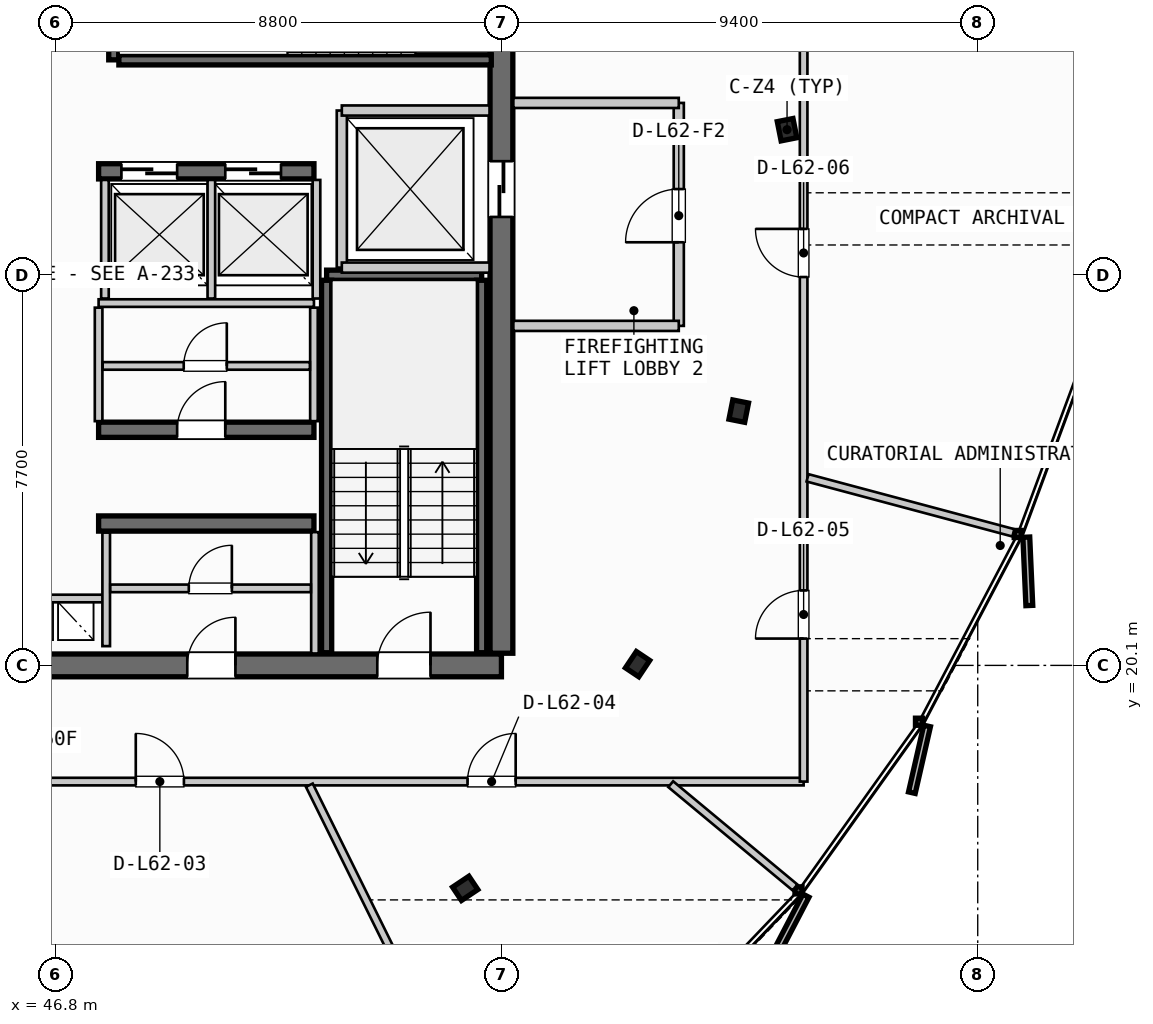
"""IFC4 building model, lengths in metres.
Left out: names, types, materials, properties, quantities, classifications, styles, units other than length and angle.
Written with IfcOpenShell. Run it as: python <this file> out.ifc"""

import sys

from ifc_helpers import new_model, si_unit, direction, frame, frame_2d, origin, origin_2d, place, context, subcontext, project, spatial, rectangle, i_section, extrude, source, transform, mapped, element, fill, save


model = new_model("IFC4")
c1 = context("Model", 3, precision=1e-05, world=origin(), true_north=direction((0.0, 1.0)))
c2 = subcontext(c1, "Body", "Model", "MODEL_VIEW")
j1 = project(units=[si_unit("LENGTHUNIT", "METRE"), si_unit("PLANEANGLEUNIT", "RADIAN")], contexts=[c1])
p1 = place(None, origin())
s1 = spatial("IfcSite", under=j1, at=p1, CompositionType="ELEMENT")
p2 = place(p1, origin())
s2 = spatial("IfcBuilding", under=s1, at=p2, CompositionType="ELEMENT")
p3 = place(p2, frame((0.0, 0.0, 238.75)))
s3 = spatial("IfcBuildingStorey", under=s2, at=p3, CompositionType="ELEMENT", Elevation=238.75)
p4 = place(p3, frame((38.0, 20.1, 0.0), z_axis=(0.0, 0.0, 1.0), x_axis=(1.0, 0.0, 0.0)))
e1 = element("IfcWall", 1, at=p4, inside=s3, PredefinedType="SHEAR", context=c2, shape_type="SweptSolid", body=[
    extrude(rectangle(XDim=17.6, YDim=0.45, at=frame_2d((8.8, 0.0))), origin(), (0.0, 0.0, 1.0), 3.21),
])
p5 = place(p4, frame((1.4, 0.0, 0.0)))
e2 = element("IfcOpeningElement", 2, at=p5, cuts=e1, PredefinedType="OPENING", context=c2, shape_type="SweptSolid", body=[
    extrude(rectangle(XDim=1.05, YDim=2.15, at=frame_2d((0.525, 1.075))), frame((0.0, 0.235, 0.0), z_axis=(0.0, -1.0, 0.0), x_axis=(1.0, 0.0, 0.0)), (0.0, 0.0, 1.0), 0.47),
])
p6 = place(p4, frame((15.15, 0.0, 0.0)))
e3 = element("IfcOpeningElement", 3, at=p6, cuts=e1, PredefinedType="OPENING", context=c2, shape_type="SweptSolid", body=[
    extrude(rectangle(XDim=1.05, YDim=2.15, at=frame_2d((0.525, 1.075))), frame((0.0, 0.235, 0.0), z_axis=(0.0, -1.0, 0.0), x_axis=(1.0, 0.0, 0.0)), (0.0, 0.0, 1.0), 0.47),
])
p7 = place(p4, frame((5.25, 0.0, 0.0)))
e4 = element("IfcOpeningElement", 4, at=p7, cuts=e1, PredefinedType="OPENING", context=c2, shape_type="SweptSolid", body=[
    extrude(rectangle(XDim=0.9, YDim=2.15, at=frame_2d((0.45, 1.075))), frame((0.0, 0.235, 0.0), z_axis=(0.0, -1.0, 0.0), x_axis=(1.0, 0.0, 0.0)), (0.0, 0.0, 1.0), 0.47),
])
p8 = place(p4, frame((11.4, 0.0, 0.0)))
e5 = element("IfcOpeningElement", 5, at=p8, cuts=e1, PredefinedType="OPENING", context=c2, shape_type="SweptSolid", body=[
    extrude(rectangle(XDim=0.95, YDim=2.15, at=frame_2d((0.475, 1.075))), frame((0.0, 0.235, 0.0), z_axis=(0.0, -1.0, 0.0), x_axis=(1.0, 0.0, 0.0)), (0.0, 0.0, 1.0), 0.47),
])
p9 = place(p3, frame((55.6, 20.34, 0.0), z_axis=(0.0, 0.0, 1.0), x_axis=(0.0, 1.0, 0.0)))
e6 = element("IfcWall", 6, at=p9, inside=s3, PredefinedType="SHEAR", context=c2, shape_type="SweptSolid", body=[
    extrude(rectangle(XDim=14.92, YDim=0.45, at=frame_2d((7.46, 0.0))), origin(), (0.0, 0.0, 1.0), 3.21),
])
p10 = place(p9, frame((12.71, 0.0, 0.0)))
e7 = element("IfcOpeningElement", 7, at=p10, cuts=e6, PredefinedType="OPENING", context=c2, shape_type="SweptSolid", body=[
    extrude(rectangle(XDim=1.05, YDim=2.15, at=frame_2d((0.525, 1.075))), frame((0.0, 0.235, 0.0), z_axis=(0.0, -1.0, 0.0), x_axis=(1.0, 0.0, 0.0)), (0.0, 0.0, 1.0), 0.47),
])
p11 = place(p9, frame((8.61, 0.0, 0.0)))
e8 = element("IfcOpeningElement", 8, at=p11, cuts=e6, PredefinedType="OPENING", context=c2, shape_type="SweptSolid", body=[
    extrude(rectangle(XDim=1.1, YDim=2.2, at=frame_2d((0.55, 1.1))), frame((0.0, 0.235, 0.0), z_axis=(0.0, -1.0, 0.0), x_axis=(1.0, 0.0, 0.0)), (0.0, 0.0, 1.0), 0.47),
])
p12 = place(p3, frame((47.65, 22.9, 0.0), z_axis=(0.0, 0.0, 1.0), x_axis=(1.0, 0.0, 0.0)))
e9 = element("IfcWall", 9, at=p12, inside=s3, PredefinedType="SHEAR", context=c2, shape_type="SweptSolid", body=[
    extrude(rectangle(XDim=4.25, YDim=0.3, at=frame_2d((2.125, 0.0))), origin(), (0.0, 0.0, 1.0), 3.21),
])
p13 = place(p3, frame((47.65, 24.75, 0.0), z_axis=(0.0, 0.0, 1.0), x_axis=(1.0, 0.0, 0.0)))
e10 = element("IfcWall", 10, at=p13, inside=s3, PredefinedType="SHEAR", context=c2, shape_type="SweptSolid", body=[
    extrude(rectangle(XDim=4.25, YDim=0.3, at=frame_2d((2.125, 0.0))), origin(), (0.0, 0.0, 1.0), 3.21),
])
p14 = place(p13, frame((1.55, 0.0, 0.0)))
e11 = element("IfcOpeningElement", 11, at=p14, cuts=e10, PredefinedType="OPENING", context=c2, shape_type="SweptSolid", body=[
    extrude(rectangle(XDim=0.95, YDim=2.15, at=frame_2d((0.475, 1.075))), frame((0.0, 0.16, 0.0), z_axis=(0.0, -1.0, 0.0), x_axis=(1.0, 0.0, 0.0)), (0.0, 0.0, 1.0), 0.32),
])
p15 = place(p3, frame((47.65, 29.85, 0.0), z_axis=(0.0, 0.0, 1.0), x_axis=(1.0, 0.0, 0.0)))
e12 = element("IfcWall", 12, at=p15, inside=s3, PredefinedType="SHEAR", context=c2, shape_type="SweptSolid", body=[
    extrude(rectangle(XDim=4.25, YDim=0.3, at=frame_2d((2.125, 0.0))), origin(), (0.0, 0.0, 1.0), 3.21),
])
p16 = place(p15, frame((0.45, 0.0, 0.0)))
e13 = element("IfcOpeningElement", 13, at=p16, cuts=e12, PredefinedType="OPENING", context=c2, shape_type="SweptSolid", body=[
    extrude(rectangle(XDim=1.1, YDim=2.2, at=frame_2d((0.55, 1.1))), frame((0.0, 0.16, 0.0), z_axis=(0.0, -1.0, 0.0), x_axis=(1.0, 0.0, 0.0)), (0.0, 0.0, 1.0), 0.32),
])
p17 = place(p15, frame((2.5, 0.0, 0.0)))
e14 = element("IfcOpeningElement", 14, at=p17, cuts=e12, PredefinedType="OPENING", context=c2, shape_type="SweptSolid", body=[
    extrude(rectangle(XDim=1.1, YDim=2.2, at=frame_2d((0.55, 1.1))), frame((0.0, 0.16, 0.0), z_axis=(0.0, -1.0, 0.0), x_axis=(1.0, 0.0, 0.0)), (0.0, 0.0, 1.0), 0.32),
])
m1 = source(origin(), c2, "Body", "SweptSolid", [
    extrude(i_section(OverallWidth=0.387, OverallDepth=0.316, WebThickness=0.019, FlangeThickness=0.028, FilletRadius=0.015, at=origin_2d()), origin(), (0.0, 0.0, 1.0), 3.21),
])
for number, where, z_axis, x_axis in (
    (15, (61.237, 30.672, 0.0), (0.0, 0.0, 1.0), (0.981, 0.195, 0.0)),
    (16, (54.885, 15.7, 0.0), (0.0, 0.0, 1.0), (0.556, -0.831, 0.0)),
    (17, (58.287, 20.125, 0.0), (0.0, 0.0, 1.0), (0.831, -0.556, 0.0)),
    (18, (60.284, 25.118, 0.0), (0.0, 0.0, 1.0), (0.981, -0.195, 0.0)),
):
    element("IfcColumn", number, at=place(p3, frame(where, z_axis=z_axis, x_axis=x_axis)), inside=s3, PredefinedType="COLUMN", context=c2, shape_type="MappedRepresentation", body=[
        mapped(m1, transform((0.0, 0.0, 0.0), scale=1.0)),
    ])
p18 = place(p3, frame((52.15, 27.8, 0.0), z_axis=(0.0, 0.0, 1.0), x_axis=(1.0, 0.0, 0.0)))
e19 = element("IfcWall", 19, at=p18, inside=s3, PredefinedType="SHEAR", context=c2, shape_type="SweptSolid", body=[
    extrude(rectangle(XDim=3.06, YDim=0.2, at=frame_2d((1.53, 0.0))), origin(), (0.0, 0.0, 1.0), 3.21),
])
for number, where, z_axis, x_axis in (
    (20, (55.21, 27.7, 0.0), (0.0, 0.0, 1.0), (0.0, -1.0, 0.0)),
    (21, (52.15, 20.35, 0.0), (0.0, 0.0, 1.0), (0.0, 1.0, 0.0)),
):
    element("IfcWall", number, at=place(p3, frame(where, z_axis=z_axis, x_axis=x_axis)), inside=s3, PredefinedType="SHEAR", context=c2, shape_type="SweptSolid", body=[
        extrude(rectangle(XDim=7.35, YDim=0.2, at=frame_2d((3.675, 0.0))), origin(), (0.0, 0.0, 1.0), 3.21),
    ])
p19 = place(p3, frame((47.95, 32.05, 0.0), z_axis=(0.0, 0.0, 1.0), x_axis=(0.0, 1.0, 0.0)))
e22 = element("IfcWall", 22, at=p19, inside=s3, PredefinedType="SHEAR", context=c2, shape_type="SweptSolid", body=[
    extrude(rectangle(XDim=3.06, YDim=0.2, at=frame_2d((1.53, 0.0))), origin(), (0.0, 0.0, 1.0), 3.21),
])
p20 = place(p3, frame((55.4, 32.05, 0.0), z_axis=(0.0, 0.0, 1.0), x_axis=(-1.0, 0.0, 0.0)))
e23 = element("IfcWall", 23, at=p20, inside=s3, PredefinedType="SHEAR", context=c2, shape_type="SweptSolid", body=[
    extrude(rectangle(XDim=7.35, YDim=0.2, at=frame_2d((3.675, 0.0))), origin(), (0.0, 0.0, 1.0), 3.21),
])
p21 = place(p3, frame((45.8, 21.42, 0.0), z_axis=(0.0, 0.0, 1.0), x_axis=(1.0, 0.0, 0.0)))
e24 = element("IfcWall", 24, at=p21, inside=s3, PredefinedType="PARTITIONING", context=c2, shape_type="SweptSolid", body=[
    extrude(rectangle(XDim=2.0, YDim=0.15, at=frame_2d((1.0, 0.0))), origin(), (0.0, 0.0, 1.0), 2.28),
])
p22 = place(p3, frame((47.8, 20.48, 0.0), z_axis=(0.0, 0.0, 1.0), x_axis=(0.0, 1.0, 0.0)))
e25 = element("IfcWall", 25, at=p22, inside=s3, PredefinedType="PARTITIONING", context=c2, shape_type="SweptSolid", body=[
    extrude(rectangle(XDim=2.24, YDim=0.15, at=frame_2d((1.12, 0.0))), origin(), (0.0, 0.0, 1.0), 2.28),
])
p23 = place(p3, frame((52.45, 27.95, 0.0), z_axis=(0.0, 0.0, 1.0), x_axis=(0.0, 1.0, 0.0)))
e26 = element("IfcWall", 26, at=p23, inside=s3, PredefinedType="PARTITIONING", context=c2, shape_type="SweptSolid", body=[
    extrude(rectangle(XDim=3.1, YDim=0.2, at=frame_2d((1.55, 0.0))), origin(), (0.0, 0.0, 1.0), 2.28),
])
for number, where, z_axis, x_axis in (
    (27, (52.45, 27.95, 0.0), (0.0, 0.0, 1.0), (1.0, 0.0, 0.0)),
    (28, (52.45, 31.05, 0.0), (0.0, 0.0, 1.0), (1.0, 0.0, 0.0)),
):
    element("IfcWall", number, at=place(p3, frame(where, z_axis=z_axis, x_axis=x_axis)), inside=s3, PredefinedType="PARTITIONING", context=c2, shape_type="SweptSolid", body=[
        extrude(rectangle(XDim=2.915, YDim=0.2, at=frame_2d((1.458, 0.0))), origin(), (0.0, 0.0, 1.0), 2.28),
    ])
p24 = place(p3, frame((59.1, 26.8, 0.0), z_axis=(0.0, 0.0, 1.0), x_axis=(0.0, 1.0, 0.0)))
e29 = element("IfcWall", 29, at=p24, inside=s3, PredefinedType="PARTITIONING", context=c2, shape_type="SweptSolid", body=[
    extrude(rectangle(XDim=4.4, YDim=0.2, at=frame_2d((2.2, 0.0))), origin(), (0.0, 0.0, 1.0), 2.28),
])
p25 = place(p24, frame((1.65, 0.0, 0.0)))
e30 = element("IfcOpeningElement", 30, at=p25, cuts=e29, PredefinedType="OPENING", context=c2, shape_type="SweptSolid", body=[
    extrude(rectangle(XDim=1.05, YDim=2.15, at=frame_2d((0.525, 1.075))), frame((0.0, 0.11, 0.0), z_axis=(0.0, -1.0, 0.0), x_axis=(1.0, 0.0, 0.0)), (0.0, 0.0, 1.0), 0.22),
])
for number, where, z_axis, x_axis in (
    (31, (55.835, 26.8, 0.0), (0.0, 0.0, 1.0), (1.0, 0.0, 0.0)),
    (32, (55.835, 31.2, 0.0), (0.0, 0.0, 1.0), (1.0, 0.0, 0.0)),
):
    element("IfcWall", number, at=place(p3, frame(where, z_axis=z_axis, x_axis=x_axis)), inside=s3, PredefinedType="PARTITIONING", context=c2, shape_type="SweptSolid", body=[
        extrude(rectangle(XDim=3.265, YDim=0.2, at=frame_2d((1.633, 0.0))), origin(), (0.0, 0.0, 1.0), 2.28),
    ])
p26 = place(p3, frame((51.92, 20.335, 0.0), z_axis=(0.0, 0.0, 1.0), x_axis=(0.0, 1.0, 0.0)))
e33 = element("IfcWall", 33, at=p26, inside=s3, PredefinedType="PARTITIONING", context=c2, shape_type="SweptSolid", body=[
    extrude(rectangle(XDim=2.395, YDim=0.15, at=frame_2d((1.198, 0.0))), origin(), (0.0, 0.0, 1.0), 2.28),
])
p27 = place(p3, frame((47.88, 21.62, 0.0), z_axis=(0.0, 0.0, 1.0), x_axis=(1.0, 0.0, 0.0)))
e34 = element("IfcWall", 34, at=p27, inside=s3, PredefinedType="PARTITIONING", context=c2, shape_type="SweptSolid", body=[
    extrude(rectangle(XDim=3.96, YDim=0.15, at=frame_2d((1.98, 0.0))), origin(), (0.0, 0.0, 1.0), 2.28),
])
p28 = place(p27, frame((1.55, 0.0, 0.0)))
e35 = element("IfcOpeningElement", 35, at=p28, cuts=e34, PredefinedType="OPENING", context=c2, shape_type="SweptSolid", body=[
    extrude(rectangle(XDim=0.85, YDim=2.15, at=frame_2d((0.425, 1.075))), frame((0.0, 0.085, 0.0), z_axis=(0.0, -1.0, 0.0), x_axis=(1.0, 0.0, 0.0)), (0.0, 0.0, 1.0), 0.17),
])
p29 = place(p3, frame((47.65, 27.25, 0.0), z_axis=(0.0, 0.0, 1.0), x_axis=(1.0, 0.0, 0.0)))
e36 = element("IfcWall", 36, at=p29, inside=s3, PredefinedType="PARTITIONING", context=c2, shape_type="SweptSolid", body=[
    extrude(rectangle(XDim=4.25, YDim=0.15, at=frame_2d((2.125, 0.0))), origin(), (0.0, 0.0, 1.0), 2.28),
])
for number, where, z_axis, x_axis in (
    (37, (47.65, 24.92, 0.0), (0.0, 0.0, 1.0), (0.0, 1.0, 0.0)),
    (38, (51.9, 24.92, 0.0), (0.0, 0.0, 1.0), (0.0, 1.0, 0.0)),
):
    element("IfcWall", number, at=place(p3, frame(where, z_axis=z_axis, x_axis=x_axis)), inside=s3, PredefinedType="PARTITIONING", context=c2, shape_type="SweptSolid", body=[
        extrude(rectangle(XDim=2.24, YDim=0.15, at=frame_2d((1.12, 0.0))), origin(), (0.0, 0.0, 1.0), 2.28),
    ])
p30 = place(p3, frame((47.73, 26.01, 0.0), z_axis=(0.0, 0.0, 1.0), x_axis=(1.0, 0.0, 0.0)))
e39 = element("IfcWall", 39, at=p30, inside=s3, PredefinedType="PARTITIONING", context=c2, shape_type="SweptSolid", body=[
    extrude(rectangle(XDim=4.09, YDim=0.15, at=frame_2d((2.045, 0.0))), origin(), (0.0, 0.0, 1.0), 2.28),
])
p31 = place(p30, frame((1.6, 0.0, 0.0)))
e40 = element("IfcOpeningElement", 40, at=p31, cuts=e39, PredefinedType="OPENING", context=c2, shape_type="SweptSolid", body=[
    extrude(rectangle(XDim=0.85, YDim=2.15, at=frame_2d((0.425, 1.075))), frame((0.0, 0.085, 0.0), z_axis=(0.0, -1.0, 0.0), x_axis=(1.0, 0.0, 0.0)), (0.0, 0.0, 1.0), 0.17),
])
for number, where, z_axis, x_axis in (
    (41, (47.775, 27.34, 0.0), (0.0, 0.0, 1.0), (0.0, 1.0, 0.0)),
    (42, (49.875, 27.34, 0.0), (0.0, 0.0, 1.0), (0.0, 1.0, 0.0)),
    (43, (51.95, 27.34, 0.0), (0.0, 0.0, 1.0), (0.0, 1.0, 0.0)),
):
    element("IfcWall", number, at=place(p3, frame(where, z_axis=z_axis, x_axis=x_axis)), inside=s3, PredefinedType="PARTITIONING", context=c2, shape_type="SweptSolid", body=[
        extrude(rectangle(XDim=2.34, YDim=0.15, at=frame_2d((1.17, 0.0))), origin(), (0.0, 0.0, 1.0), 2.28),
    ])
p32 = place(p3, frame((31.29, 17.807, 0.0), z_axis=(0.0, 0.0, 1.0), x_axis=(1.0, 0.0, 0.0)))
e44 = element("IfcWall", 44, at=p32, inside=s3, PredefinedType="PARTITIONING", context=c2, shape_type="SweptSolid", body=[
    extrude(rectangle(XDim=30.274, YDim=0.15, at=frame_2d((15.137, 0.0))), origin(), (0.0, 0.0, 1.0), 2.28),
])
p33 = place(p32, frame((5.45, 0.0, 0.0)))
e45 = element("IfcOpeningElement", 45, at=p33, cuts=e44, PredefinedType="OPENING", context=c2, shape_type="SweptSolid", body=[
    extrude(rectangle(XDim=0.95, YDim=2.15, at=frame_2d((0.475, 1.075))), frame((0.0, 0.085, 0.0), z_axis=(0.0, -1.0, 0.0), x_axis=(1.0, 0.0, 0.0)), (0.0, 0.0, 1.0), 0.17),
])
p34 = place(p32, frame((12.459, 0.0, 0.0)))
e46 = element("IfcOpeningElement", 46, at=p34, cuts=e44, PredefinedType="OPENING", context=c2, shape_type="SweptSolid", body=[
    extrude(rectangle(XDim=0.95, YDim=2.15, at=frame_2d((0.475, 1.075))), frame((0.0, 0.085, 0.0), z_axis=(0.0, -1.0, 0.0), x_axis=(1.0, 0.0, 0.0)), (0.0, 0.0, 1.0), 0.17),
])
p35 = place(p32, frame((17.094, 0.0, 0.0)))
e47 = element("IfcOpeningElement", 47, at=p35, cuts=e44, PredefinedType="OPENING", context=c2, shape_type="SweptSolid", body=[
    extrude(rectangle(XDim=0.95, YDim=2.15, at=frame_2d((0.475, 1.075))), frame((0.0, 0.085, 0.0), z_axis=(0.0, -1.0, 0.0), x_axis=(1.0, 0.0, 0.0)), (0.0, 0.0, 1.0), 0.17),
])
p36 = place(p32, frame((23.641, 0.0, 0.0)))
e48 = element("IfcOpeningElement", 48, at=p36, cuts=e44, PredefinedType="OPENING", context=c2, shape_type="SweptSolid", body=[
    extrude(rectangle(XDim=0.95, YDim=2.15, at=frame_2d((0.475, 1.075))), frame((0.0, 0.085, 0.0), z_axis=(0.0, -1.0, 0.0), x_axis=(1.0, 0.0, 0.0)), (0.0, 0.0, 1.0), 0.17),
])
p37 = place(p3, frame((61.564, 17.807, 0.0), z_axis=(0.0, 0.0, 1.0), x_axis=(0.0, 1.0, 0.0)))
e49 = element("IfcWall", 49, at=p37, inside=s3, PredefinedType="PARTITIONING", context=c2, shape_type="SweptSolid", body=[
    extrude(rectangle(XDim=19.986, YDim=0.15, at=frame_2d((9.993, 0.0))), origin(), (0.0, 0.0, 1.0), 2.28),
])
p38 = place(p37, frame((2.823, 0.0, 0.0)))
e50 = element("IfcOpeningElement", 50, at=p38, cuts=e49, PredefinedType="OPENING", context=c2, shape_type="SweptSolid", body=[
    extrude(rectangle(XDim=0.95, YDim=2.15, at=frame_2d((0.475, 1.075))), frame((0.0, 0.085, 0.0), z_axis=(0.0, -1.0, 0.0), x_axis=(1.0, 0.0, 0.0)), (0.0, 0.0, 1.0), 0.17),
])
p39 = place(p37, frame((9.957, 0.0, 0.0)))
e51 = element("IfcOpeningElement", 51, at=p39, cuts=e49, PredefinedType="OPENING", context=c2, shape_type="SweptSolid", body=[
    extrude(rectangle(XDim=0.95, YDim=2.15, at=frame_2d((0.475, 1.075))), frame((0.0, 0.085, 0.0), z_axis=(0.0, -1.0, 0.0), x_axis=(1.0, 0.0, 0.0)), (0.0, 0.0, 1.0), 0.17),
])
p40 = place(p37, frame((15.774, 0.0, 0.0)))
e52 = element("IfcOpeningElement", 52, at=p40, cuts=e49, PredefinedType="OPENING", context=c2, shape_type="SweptSolid", body=[
    extrude(rectangle(XDim=0.95, YDim=2.15, at=frame_2d((0.475, 1.075))), frame((0.0, 0.085, 0.0), z_axis=(0.0, -1.0, 0.0), x_axis=(1.0, 0.0, 0.0)), (0.0, 0.0, 1.0), 0.17),
])
p41 = place(p3, frame((51.809, 17.735, 0.0), z_axis=(0.0, 0.0, 1.0), x_axis=(0.443430935713, -0.896308543557, 0.0)))
e53 = element("IfcWall", 53, at=p41, inside=s3, PredefinedType="PARTITIONING", context=c2, shape_type="SweptSolid", body=[
    extrude(rectangle(XDim=8.244, YDim=0.15, at=frame_2d((4.122, 0.0))), origin(), (0.0, 0.0, 1.0), 2.28),
])
p42 = place(p3, frame((58.941, 17.756, 0.0), z_axis=(0.0, 0.0, 1.0), x_axis=(0.769180531138, -0.639031541098, 0.0)))
e54 = element("IfcWall", 54, at=p42, inside=s3, PredefinedType="PARTITIONING", context=c2, shape_type="SweptSolid", body=[
    extrude(rectangle(XDim=3.189, YDim=0.15, at=frame_2d((1.594, 0.0))), origin(), (0.0, 0.0, 1.0), 2.28),
])
p43 = place(p3, frame((61.641, 23.802, 0.0), z_axis=(0.0, 0.0, 1.0), x_axis=(0.966112425525, -0.258121640407, 0.0)))
e55 = element("IfcWall", 55, at=p43, inside=s3, PredefinedType="PARTITIONING", context=c2, shape_type="SweptSolid", body=[
    extrude(rectangle(XDim=4.204, YDim=0.15, at=frame_2d((2.102, 0.0))), origin(), (0.0, 0.0, 1.0), 2.28),
])
m2 = source(origin(), c2, "Body", "SweptSolid", [
    extrude(rectangle(XDim=1.05, YDim=2.15, at=frame_2d((0.525, 1.075))), frame((0.0, 0.025, 0.0), z_axis=(0.0, -1.0, 0.0), x_axis=(1.0, 0.0, 0.0)), (0.0, 0.0, 1.0), 0.05),
])
p44 = place(p6, origin())
e56 = element("IfcDoor", 56, at=p44, inside=s3, OperationType="SINGLE_SWING_RIGHT", PredefinedType="DOOR", context=c2, shape_type="MappedRepresentation", body=[
    mapped(m2, transform((0.0, 0.0, 0.0), scale=1.0)),
])
fill(e3, e56)
m3 = source(origin(), c2, "Body", "SweptSolid", [
    extrude(rectangle(XDim=1.1, YDim=2.2, at=frame_2d((0.55, 1.1))), frame((0.0, 0.025, 0.0), z_axis=(0.0, -1.0, 0.0), x_axis=(1.0, 0.0, 0.0)), (0.0, 0.0, 1.0), 0.05),
])
p45 = place(p11, origin())
e57 = element("IfcDoor", 57, at=p45, inside=s3, OperationType="SLIDING_TO_RIGHT", PredefinedType="DOOR", context=c2, shape_type="MappedRepresentation", body=[
    mapped(m3, transform((0.0, 0.0, 0.0), scale=1.0)),
])
fill(e8, e57)
m4 = source(origin(), c2, "Body", "SweptSolid", [
    extrude(rectangle(XDim=0.95, YDim=2.15, at=frame_2d((0.475, 1.075))), frame((0.0, 0.025, 0.0), z_axis=(0.0, -1.0, 0.0), x_axis=(1.0, 0.0, 0.0)), (0.0, 0.0, 1.0), 0.05),
])
p46 = place(p8, origin())
e58 = element("IfcDoor", 58, at=p46, inside=s3, OperationType="SINGLE_SWING_RIGHT", PredefinedType="DOOR", context=c2, shape_type="MappedRepresentation", body=[
    mapped(m4, transform((0.0, 0.0, 0.0), scale=1.0)),
])
fill(e5, e58)
p47 = place(p14, origin())
e59 = element("IfcDoor", 59, at=p47, inside=s3, OperationType="SINGLE_SWING_RIGHT", PredefinedType="DOOR", context=c2, shape_type="MappedRepresentation", body=[
    mapped(m4, transform((0.0, 0.0, 0.0), scale=1.0)),
])
fill(e11, e59)
p48 = place(p16, origin())
e60 = element("IfcDoor", 60, at=p48, inside=s3, OperationType="SLIDING_TO_LEFT", PredefinedType="DOOR", context=c2, shape_type="MappedRepresentation", body=[
    mapped(m3, transform((0.0, 0.0, 0.0), scale=1.0)),
])
fill(e13, e60)
p49 = place(p17, origin())
e61 = element("IfcDoor", 61, at=p49, inside=s3, OperationType="SLIDING_TO_LEFT", PredefinedType="DOOR", context=c2, shape_type="MappedRepresentation", body=[
    mapped(m3, transform((0.0, 0.0, 0.0), scale=1.0)),
])
fill(e14, e61)
p50 = place(p25, origin())
e62 = element("IfcDoor", 62, at=p50, inside=s3, OperationType="SINGLE_SWING_LEFT", PredefinedType="DOOR", context=c2, shape_type="MappedRepresentation", body=[
    mapped(m2, transform((0.0, 0.0, 0.0), scale=1.0)),
])
fill(e30, e62)
m5 = source(origin(), c2, "Body", "SweptSolid", [
    extrude(rectangle(XDim=0.85, YDim=2.15, at=frame_2d((0.425, 1.075))), frame((0.0, 0.025, 0.0), z_axis=(0.0, -1.0, 0.0), x_axis=(1.0, 0.0, 0.0)), (0.0, 0.0, 1.0), 0.05),
])
p51 = place(p28, origin())
e63 = element("IfcDoor", 63, at=p51, inside=s3, OperationType="SINGLE_SWING_RIGHT", PredefinedType="DOOR", context=c2, shape_type="MappedRepresentation", body=[
    mapped(m5, transform((0.0, 0.0, 0.0), scale=1.0)),
])
fill(e35, e63)
p52 = place(p31, origin())
e64 = element("IfcDoor", 64, at=p52, inside=s3, OperationType="SINGLE_SWING_RIGHT", PredefinedType="DOOR", context=c2, shape_type="MappedRepresentation", body=[
    mapped(m5, transform((0.0, 0.0, 0.0), scale=1.0)),
])
fill(e40, e64)
p53 = place(p35, origin())
e65 = element("IfcDoor", 65, at=p53, inside=s3, OperationType="SINGLE_SWING_LEFT", PredefinedType="DOOR", context=c2, shape_type="MappedRepresentation", body=[
    mapped(m4, transform((0.0, 0.0, 0.0), scale=1.0)),
])
fill(e47, e65)
p54 = place(p36, origin())
e66 = element("IfcDoor", 66, at=p54, inside=s3, OperationType="SINGLE_SWING_RIGHT", PredefinedType="DOOR", context=c2, shape_type="MappedRepresentation", body=[
    mapped(m4, transform((0.0, 0.0, 0.0), scale=1.0)),
])
fill(e48, e66)
p55 = place(p38, origin())
e67 = element("IfcDoor", 67, at=p55, inside=s3, OperationType="SINGLE_SWING_LEFT", PredefinedType="DOOR", context=c2, shape_type="MappedRepresentation", body=[
    mapped(m4, transform((0.0, 0.0, 0.0), scale=1.0)),
])
fill(e50, e67)
p56 = place(p39, origin())
e68 = element("IfcDoor", 68, at=p56, inside=s3, OperationType="SINGLE_SWING_RIGHT", PredefinedType="DOOR", context=c2, shape_type="MappedRepresentation", body=[
    mapped(m4, transform((0.0, 0.0, 0.0), scale=1.0)),
])
fill(e51, e68)
save(model, sys.argv[1])
